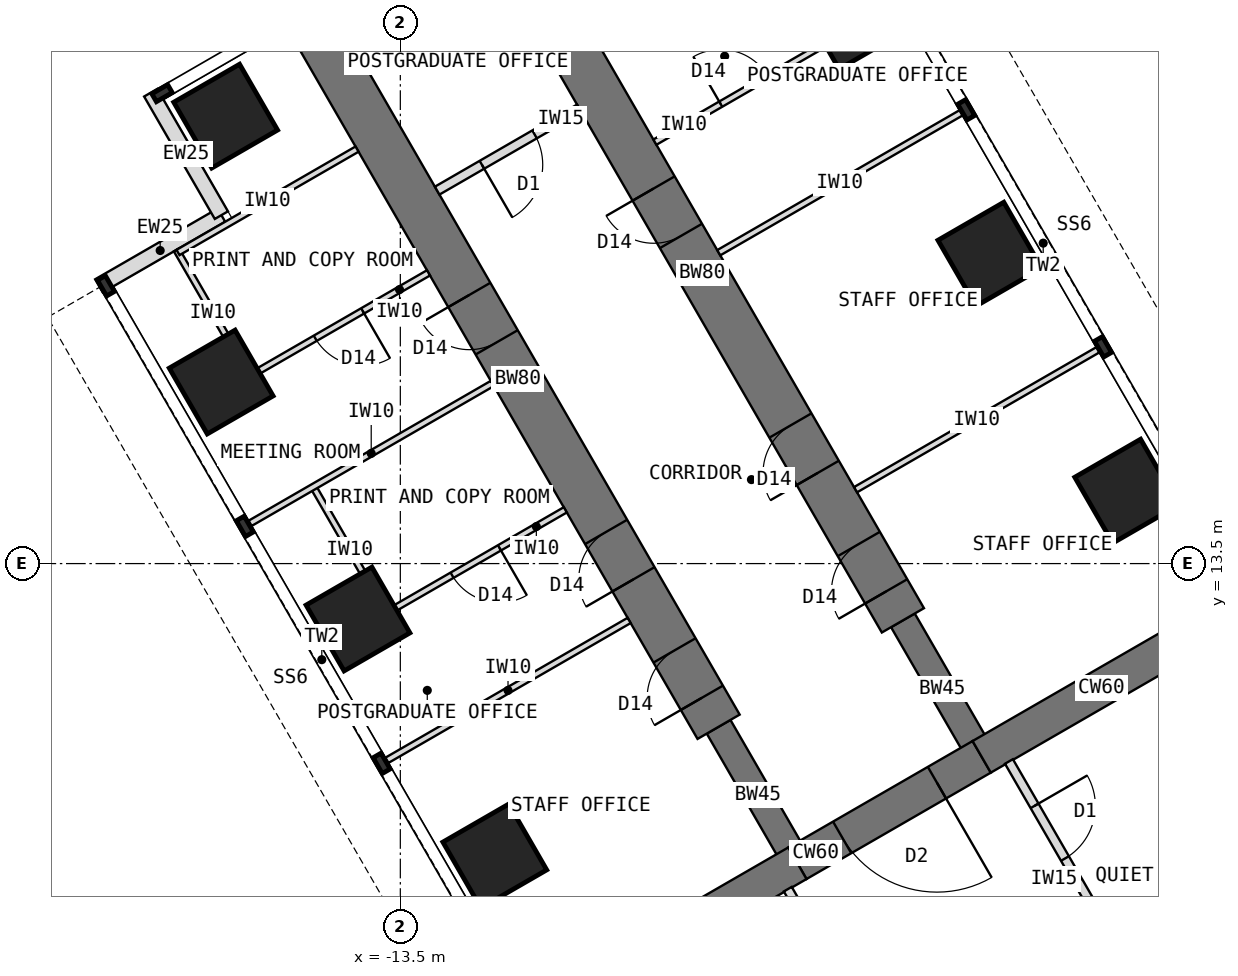
"""IFC4 building model, lengths in metres.
Left out: names, types, materials, properties, quantities, classifications, styles, units other than length and angle.
Written with IfcOpenShell. Run it as: python <this file> out.ifc"""

import sys

from ifc_helpers import new_model, si_unit, direction, frame, frame_2d, origin, origin_2d, place, context, subcontext, project, spatial, rectangle, extrude, element, fill, save


model = new_model("IFC4")
c1 = context("Model", 3, precision=1e-05, world=origin(), true_north=direction((0.0, 1.0)))
c2 = subcontext(c1, "Body", "Model", "MODEL_VIEW")
j1 = project(units=[si_unit("LENGTHUNIT", "METRE"), si_unit("PLANEANGLEUNIT", "RADIAN")], contexts=[c1])
p1 = place(None, origin())
s1 = spatial("IfcSite", under=j1, at=p1, CompositionType="ELEMENT")
p2 = place(p1, origin())
s2 = spatial("IfcBuilding", under=s1, at=p2, CompositionType="ELEMENT")
p3 = place(p2, frame((0.0, 0.0, 161.5)))
s3 = spatial("IfcBuildingStorey", under=s2, at=p3, CompositionType="ELEMENT", Elevation=161.5)
p4 = place(p3, frame((0.0, 12.596, 0.0), z_axis=(0.0, 0.0, 1.0), x_axis=(-0.866011268655, -0.500024481964, 0.0)))
e1 = element("IfcWall", 1, at=p4, inside=s3, PredefinedType="SHEAR", context=c2, shape_type="SweptSolid", body=[
    extrude(rectangle(XDim=4.548, YDim=0.6, at=frame_2d((2.274, 0.0))), origin(), (0.0, 0.0, 1.0), 4.0),
])
p5 = place(p3, frame((-3.939, 10.322, 0.0), z_axis=(0.0, 0.0, 1.0), x_axis=(-0.866019471182, -0.500010275428, 0.0)))
e2 = element("IfcWall", 2, at=p5, inside=s3, PredefinedType="SHEAR", context=c2, shape_type="SweptSolid", body=[
    extrude(rectangle(XDim=3.5, YDim=0.6, at=frame_2d((1.75, 0.0))), origin(), (0.0, 0.0, 1.0), 4.0),
])
p6 = place(p5, frame((0.85, 0.0, 0.0)))
e3 = element("IfcOpeningElement", 3, at=p6, cuts=e2, PredefinedType="OPENING", context=c2, shape_type="SweptSolid", body=[
    extrude(rectangle(XDim=1.8, YDim=2.1, at=frame_2d((0.9, 1.05))), frame((0.0, 0.31, 0.0), z_axis=(0.0, -1.0, 0.0), x_axis=(1.0, 0.0, 0.0)), (0.0, 0.0, 1.0), 0.62),
])
p7 = place(p3, frame((-6.97, 8.572, 0.0), z_axis=(0.0, 0.0, 1.0), x_axis=(-0.866034513004, -0.499984222037, 0.0)))
e4 = element("IfcWall", 4, at=p7, inside=s3, PredefinedType="SHEAR", context=c2, shape_type="SweptSolid", body=[
    extrude(rectangle(XDim=4.548, YDim=0.6, at=frame_2d((2.274, 0.0))), origin(), (0.0, 0.0, 1.0), 4.0),
])
p8 = place(p3, frame((-6.97, 8.572, 0.0), z_axis=(0.0, 0.0, 1.0), x_axis=(-0.499988811324, 0.866031863473, 0.0)))
e5 = element("IfcWall", 5, at=p8, inside=s3, PredefinedType="SHEAR", context=c2, shape_type="SweptSolid", body=[
    extrude(rectangle(XDim=2.592, YDim=0.45, at=frame_2d((1.296, 0.0))), origin(), (0.0, 0.0, 1.0), 4.0),
])
p9 = place(p3, frame((-8.266, 10.816, 0.0), z_axis=(0.0, 0.0, 1.0), x_axis=(-0.499996231654, 0.866027579429, 0.0)))
e6 = element("IfcWall", 6, at=p9, inside=s3, PredefinedType="SHEAR", context=c2, shape_type="SweptSolid", body=[
    extrude(rectangle(XDim=13.2, YDim=0.8, at=frame_2d((6.6, 0.0))), origin(), (0.0, 0.0, 1.0), 4.0),
])
p10 = place(p9, frame((0.55, 0.0, 0.0)))
e7 = element("IfcOpeningElement", 7, at=p10, cuts=e6, PredefinedType="OPENING", context=c2, shape_type="SweptSolid", body=[
    extrude(rectangle(XDim=0.9, YDim=2.1, at=frame_2d((0.45, 1.05))), frame((0.0, 0.41, 0.0), z_axis=(0.0, -1.0, 0.0), x_axis=(1.0, 0.0, 0.0)), (0.0, 0.0, 1.0), 0.82),
])
p11 = place(p9, frame((2.8, 0.0, 0.0)))
e8 = element("IfcOpeningElement", 8, at=p11, cuts=e6, PredefinedType="OPENING", context=c2, shape_type="SweptSolid", body=[
    extrude(rectangle(XDim=0.9, YDim=2.1, at=frame_2d((0.45, 1.05))), frame((0.0, 0.41, 0.0), z_axis=(0.0, -1.0, 0.0), x_axis=(1.0, 0.0, 0.0)), (0.0, 0.0, 1.0), 0.82),
])
p12 = place(p9, frame((7.3, 0.0, 0.0)))
e9 = element("IfcOpeningElement", 9, at=p12, cuts=e6, PredefinedType="OPENING", context=c2, shape_type="SweptSolid", body=[
    extrude(rectangle(XDim=0.9, YDim=2.1, at=frame_2d((0.45, 1.05))), frame((0.0, 0.41, 0.0), z_axis=(0.0, -1.0, 0.0), x_axis=(1.0, 0.0, 0.0)), (0.0, 0.0, 1.0), 0.82),
])
p13 = place(p3, frame((-3.939, 10.322, 0.0), z_axis=(0.0, 0.0, 1.0), x_axis=(-0.499918158782, 0.866072649678, 0.0)))
e10 = element("IfcWall", 10, at=p13, inside=s3, PredefinedType="SHEAR", context=c2, shape_type="SweptSolid", body=[
    extrude(rectangle(XDim=2.592, YDim=0.45, at=frame_2d((1.296, 0.0))), origin(), (0.0, 0.0, 1.0), 4.0),
])
p14 = place(p3, frame((-5.234, 12.566, 0.0), z_axis=(0.0, 0.0, 1.0), x_axis=(-0.500010103361, 0.866019570528, 0.0)))
e11 = element("IfcWall", 11, at=p14, inside=s3, PredefinedType="SHEAR", context=c2, shape_type="SweptSolid", body=[
    extrude(rectangle(XDim=13.2, YDim=0.8, at=frame_2d((6.6, 0.0))), origin(), (0.0, 0.0, 1.0), 4.0),
])
p15 = place(p14, frame((0.55, 0.0, 0.0)))
e12 = element("IfcOpeningElement", 12, at=p15, cuts=e11, PredefinedType="OPENING", context=c2, shape_type="SweptSolid", body=[
    extrude(rectangle(XDim=0.9, YDim=2.1, at=frame_2d((0.45, 1.05))), frame((0.0, 0.41, 0.0), z_axis=(0.0, -1.0, 0.0), x_axis=(1.0, 0.0, 0.0)), (0.0, 0.0, 1.0), 0.82),
])
p16 = place(p14, frame((2.8, 0.0, 0.0)))
e13 = element("IfcOpeningElement", 13, at=p16, cuts=e11, PredefinedType="OPENING", context=c2, shape_type="SweptSolid", body=[
    extrude(rectangle(XDim=0.9, YDim=2.1, at=frame_2d((0.45, 1.05))), frame((0.0, 0.41, 0.0), z_axis=(0.0, -1.0, 0.0), x_axis=(1.0, 0.0, 0.0)), (0.0, 0.0, 1.0), 0.82),
])
p17 = place(p14, frame((7.3, 0.0, 0.0)))
e14 = element("IfcOpeningElement", 14, at=p17, cuts=e11, PredefinedType="OPENING", context=c2, shape_type="SweptSolid", body=[
    extrude(rectangle(XDim=0.9, YDim=2.1, at=frame_2d((0.45, 1.05))), frame((0.0, 0.41, 0.0), z_axis=(0.0, -1.0, 0.0), x_axis=(1.0, 0.0, 0.0)), (0.0, 0.0, 1.0), 0.82),
])
for number, where, z_axis, x_axis in (
    (15, (-11.946, 8.691, 0.0), (0.0, 0.0, 1.0), (0.866, 0.5, 0.0)),
    (16, (-1.554, 14.691, 0.0), (0.0, 0.0, 1.0), (0.866, 0.5, 0.0)),
    (17, (-14.196, 12.588, 0.0), (0.0, 0.0, 1.0), (0.866, 0.5, 0.0)),
    (18, (-3.804, 18.588, 0.0), (0.0, 0.0, 1.0), (0.866, 0.5, 0.0)),
    (19, (-16.446, 16.486, 0.0), (0.0, 0.0, 1.0), (0.866, 0.5, 0.0)),
    (20, (-6.054, 22.486, 0.0), (0.0, 0.0, 1.0), (0.866, 0.5, 0.0)),
    (21, (-16.373, 20.858, 0.0), (0.0, 0.0, 1.0), (0.866, 0.5, 0.0)),
):
    element("IfcColumn", number, at=place(p3, frame(where, z_axis=z_axis, x_axis=x_axis)), inside=s3, PredefinedType="COLUMN", context=c2, shape_type="SweptSolid", body=[
        extrude(rectangle(XDim=1.25, YDim=1.25, at=origin_2d()), origin(), (0.0, 0.0, 1.0), 4.0),
    ])
for number, where, z_axis, x_axis in (
    (22, (-18.456, 18.067, 0.0), (0.0, 0.0, 1.0), (0.866, 0.5, 0.0)),
    (23, (-16.443, 19.23, 0.0), (0.0, 0.0, 1.0), (-0.5, 0.866, 0.0)),
):
    element("IfcWall", number, at=place(p3, frame(where, z_axis=z_axis, x_axis=x_axis)), inside=s3, PredefinedType="STANDARD", context=c2, shape_type="SweptSolid", body=[
        extrude(rectangle(XDim=2.325, YDim=0.25, at=frame_2d((1.163, 0.0))), origin(), (0.0, 0.0, 1.0), 3.7),
    ])
p18 = place(p3, frame((-1.201, 6.12, 0.0), z_axis=(0.0, 0.0, 1.0), x_axis=(0.49999668571, 0.866027317282, 0.0)))
e24 = element("IfcWall", 24, at=p18, inside=s3, PredefinedType="SHEAR", context=c2, shape_type="SweptSolid", body=[
    extrude(rectangle(XDim=5.908, YDim=0.4, at=frame_2d((2.954, 0.0))), origin(), (0.0, 0.0, 1.0), 4.0),
])
for number, where, z_axis, x_axis in (
    (25, (-9.737, 12.565, 0.0), (0.0, 0.0, 1.0), (-0.866, -0.5, 0.0)),
    (26, (-11.987, 16.462, 0.0), (0.0, 0.0, 1.0), (-0.866, -0.5, 0.0)),
):
    element("IfcWall", number, at=place(p3, frame(where, z_axis=z_axis, x_axis=x_axis)), inside=s3, PredefinedType="PARTITIONING", context=c2, shape_type="SweptSolid", body=[
        extrude(rectangle(XDim=4.6, YDim=0.1, at=frame_2d((2.3, 0.0))), origin(), (0.0, 0.0, 1.0), 3.7),
    ])
p19 = place(p3, frame((-13.731, 12.684, 0.0), z_axis=(0.0, 0.0, 1.0), x_axis=(-0.500001309137, 0.866024647952, 0.0)))
e27 = element("IfcWall", 27, at=p19, inside=s3, PredefinedType="PARTITIONING", context=c2, shape_type="SweptSolid", body=[
    extrude(rectangle(XDim=2.4, YDim=0.1, at=frame_2d((1.2, 0.0))), origin(), (0.0, 0.0, 1.0), 3.7),
])
p20 = place(p3, frame((-10.787, 14.384, 0.0), z_axis=(0.0, 0.0, 1.0), x_axis=(-0.866038511948, -0.499977295307, 0.0)))
e28 = element("IfcWall", 28, at=p20, inside=s3, PredefinedType="PARTITIONING", context=c2, shape_type="SweptSolid", body=[
    extrude(rectangle(XDim=3.4, YDim=0.1, at=frame_2d((1.7, 0.0))), origin(), (0.0, 0.0, 1.0), 3.7),
])
p21 = place(p20, frame((1.25, 0.0, 0.0)))
e29 = element("IfcOpeningElement", 29, at=p21, cuts=e28, PredefinedType="OPENING", context=c2, shape_type="SweptSolid", body=[
    extrude(rectangle(XDim=0.9, YDim=2.1, at=frame_2d((0.45, 1.05))), frame((0.0, 0.06, 0.0), z_axis=(0.0, -1.0, 0.0), x_axis=(1.0, 0.0, 0.0)), (0.0, 0.0, 1.0), 0.12),
])
p22 = place(p3, frame((-15.981, 16.581, 0.0), z_axis=(0.0, 0.0, 1.0), x_axis=(-0.499957262057, 0.866050077142, 0.0)))
e30 = element("IfcWall", 30, at=p22, inside=s3, PredefinedType="PARTITIONING", context=c2, shape_type="SweptSolid", body=[
    extrude(rectangle(XDim=2.4, YDim=0.1, at=frame_2d((1.2, 0.0))), origin(), (0.0, 0.0, 1.0), 3.7),
])
p23 = place(p3, frame((-13.037, 18.281, 0.0), z_axis=(0.0, 0.0, 1.0), x_axis=(-0.866007419912, -0.500031147688, 0.0)))
e31 = element("IfcWall", 31, at=p23, inside=s3, PredefinedType="PARTITIONING", context=c2, shape_type="SweptSolid", body=[
    extrude(rectangle(XDim=3.4, YDim=0.1, at=frame_2d((1.7, 0.0))), origin(), (0.0, 0.0, 1.0), 3.7),
])
p24 = place(p23, frame((1.25, 0.0, 0.0)))
e32 = element("IfcOpeningElement", 32, at=p24, cuts=e31, PredefinedType="OPENING", context=c2, shape_type="SweptSolid", body=[
    extrude(rectangle(XDim=0.9, YDim=2.1, at=frame_2d((0.45, 1.05))), frame((0.0, 0.06, 0.0), z_axis=(0.0, -1.0, 0.0), x_axis=(1.0, 0.0, 0.0)), (0.0, 0.0, 1.0), 0.12),
])
p25 = place(p3, frame((-14.212, 20.316, 0.0), z_axis=(0.0, 0.0, 1.0), x_axis=(-0.866007419912, -0.500031147688, 0.0)))
e33 = element("IfcWall", 33, at=p25, inside=s3, PredefinedType="PARTITIONING", context=c2, shape_type="SweptSolid", body=[
    extrude(rectangle(XDim=3.4, YDim=0.1, at=frame_2d((1.7, 0.0))), origin(), (0.0, 0.0, 1.0), 3.7),
])
for number, where, z_axis, x_axis in (
    (34, (-6.013, 14.715, 0.0), (0.0, 0.0, 1.0), (0.866, 0.5, 0.0)),
    (35, (-8.263, 18.612, 0.0), (0.0, 0.0, 1.0), (0.866, 0.5, 0.0)),
):
    element("IfcWall", number, at=place(p3, frame(where, z_axis=z_axis, x_axis=x_axis)), inside=s3, PredefinedType="PARTITIONING", context=c2, shape_type="SweptSolid", body=[
        extrude(rectangle(XDim=4.6, YDim=0.1, at=frame_2d((2.3, 0.0))), origin(), (0.0, 0.0, 1.0), 3.7),
    ])
p26 = place(p3, frame((-9.313, 20.431, 0.0), z_axis=(0.0, 0.0, 1.0), x_axis=(0.866020560687, 0.500008388397, 0.0)))
e36 = element("IfcWall", 36, at=p26, inside=s3, PredefinedType="PARTITIONING", context=c2, shape_type="SweptSolid", body=[
    extrude(rectangle(XDim=3.4, YDim=0.1, at=frame_2d((1.7, 0.0))), origin(), (0.0, 0.0, 1.0), 3.7),
])
p27 = place(p26, frame((1.25, 0.0, 0.0)))
e37 = element("IfcOpeningElement", 37, at=p27, cuts=e36, PredefinedType="OPENING", context=c2, shape_type="SweptSolid", body=[
    extrude(rectangle(XDim=0.9, YDim=2.1, at=frame_2d((0.45, 1.05))), frame((0.0, 0.06, 0.0), z_axis=(0.0, -1.0, 0.0), x_axis=(1.0, 0.0, 0.0)), (0.0, 0.0, 1.0), 0.12),
])
p28 = place(p3, frame((-4.89, 4.27, 0.0), z_axis=(0.0, 0.0, 1.0), x_axis=(-0.499999473313, 0.866025707867, 0.0)))
e38 = element("IfcWall", 38, at=p28, inside=s3, PredefinedType="PARTITIONING", context=c2, shape_type="SweptSolid", body=[
    extrude(rectangle(XDim=4.476, YDim=0.15, at=frame_2d((2.238, 0.0))), origin(), (0.0, 0.0, 1.0), 3.7),
])
p29 = place(p28, frame((0.843, 0.0, 0.0)))
e39 = element("IfcOpeningElement", 39, at=p29, cuts=e38, PredefinedType="OPENING", context=c2, shape_type="SweptSolid", body=[
    extrude(rectangle(XDim=1.0, YDim=2.1, at=frame_2d((0.5, 1.05))), frame((0.0, 0.085, 0.0), z_axis=(0.0, -1.0, 0.0), x_axis=(1.0, 0.0, 0.0)), (0.0, 0.0, 1.0), 0.17),
])
p30 = place(p3, frame((-3.49, 10.246, 0.0), z_axis=(0.0, 0.0, 1.0), x_axis=(0.499999473313, -0.866025707867, 0.0)))
e40 = element("IfcWall", 40, at=p30, inside=s3, PredefinedType="PARTITIONING", context=c2, shape_type="SweptSolid", body=[
    extrude(rectangle(XDim=4.476, YDim=0.15, at=frame_2d((2.238, 0.0))), origin(), (0.0, 0.0, 1.0), 3.7),
])
p31 = place(p30, frame((0.843, 0.0, 0.0)))
e41 = element("IfcOpeningElement", 41, at=p31, cuts=e40, PredefinedType="OPENING", context=c2, shape_type="SweptSolid", body=[
    extrude(rectangle(XDim=1.0, YDim=2.1, at=frame_2d((0.5, 1.05))), frame((0.0, 0.085, 0.0), z_axis=(0.0, -1.0, 0.0), x_axis=(1.0, 0.0, 0.0)), (0.0, 0.0, 1.0), 0.17),
])
p32 = place(p3, frame((-10.556, 20.983, 0.0), z_axis=(0.0, 0.0, 1.0), x_axis=(-0.86599734893, -0.500048589285, 0.0)))
e42 = element("IfcWall", 42, at=p32, inside=s3, PredefinedType="PARTITIONING", context=c2, shape_type="SweptSolid", body=[
    extrude(rectangle(XDim=2.7, YDim=0.15, at=frame_2d((1.35, 0.0))), origin(), (0.0, 0.0, 1.0), 3.7),
])
p33 = place(p32, frame((0.85, 0.0, 0.0)))
e43 = element("IfcOpeningElement", 43, at=p33, cuts=e42, PredefinedType="OPENING", context=c2, shape_type="SweptSolid", body=[
    extrude(rectangle(XDim=1.0, YDim=2.1, at=frame_2d((0.5, 1.05))), frame((0.0, 0.085, 0.0), z_axis=(0.0, -1.0, 0.0), x_axis=(1.0, 0.0, 0.0)), (0.0, 0.0, 1.0), 0.17),
])
p34 = place(p6, origin())
e44 = element("IfcDoor", 44, at=p34, inside=s3, OperationType="DOUBLE_DOOR_DOUBLE_SWING", PredefinedType="DOOR", context=c2, shape_type="SweptSolid", body=[
    extrude(rectangle(XDim=1.72, YDim=2.06, at=frame_2d((0.9, 1.03))), frame((0.0, 0.025, 0.0), z_axis=(0.0, -1.0, 0.0), x_axis=(1.0, 0.0, 0.0)), (0.0, 0.0, 1.0), 0.05),
    extrude(rectangle(XDim=0.04, YDim=2.1, at=frame_2d((0.02, 1.05))), frame((0.0, 0.3, 0.0), z_axis=(0.0, -1.0, 0.0), x_axis=(1.0, 0.0, 0.0)), (0.0, 0.0, 1.0), 0.6),
    extrude(rectangle(XDim=0.04, YDim=2.1, at=frame_2d((1.78, 1.05))), frame((0.0, 0.3, 0.0), z_axis=(0.0, -1.0, 0.0), x_axis=(1.0, 0.0, 0.0)), (0.0, 0.0, 1.0), 0.6),
    extrude(rectangle(XDim=1.72, YDim=0.04, at=frame_2d((0.9, 2.08))), frame((0.0, 0.3, 0.0), z_axis=(0.0, -1.0, 0.0), x_axis=(1.0, 0.0, 0.0)), (0.0, 0.0, 1.0), 0.6),
])
fill(e3, e44)
p35 = place(p21, origin())
e45 = element("IfcDoor", 45, at=p35, inside=s3, OperationType="SINGLE_SWING_LEFT", PredefinedType="DOOR", context=c2, shape_type="SweptSolid", body=[
    extrude(rectangle(XDim=0.9, YDim=2.1, at=frame_2d((0.45, 1.05))), frame((0.0, 0.025, 0.0), z_axis=(0.0, -1.0, 0.0), x_axis=(1.0, 0.0, 0.0)), (0.0, 0.0, 1.0), 0.05),
])
fill(e29, e45)
p36 = place(p24, origin())
e46 = element("IfcDoor", 46, at=p36, inside=s3, OperationType="SINGLE_SWING_LEFT", PredefinedType="DOOR", context=c2, shape_type="SweptSolid", body=[
    extrude(rectangle(XDim=0.9, YDim=2.1, at=frame_2d((0.45, 1.05))), frame((0.0, 0.025, 0.0), z_axis=(0.0, -1.0, 0.0), x_axis=(1.0, 0.0, 0.0)), (0.0, 0.0, 1.0), 0.05),
])
fill(e32, e46)
p37 = place(p27, origin())
e47 = element("IfcDoor", 47, at=p37, inside=s3, OperationType="SINGLE_SWING_LEFT", PredefinedType="DOOR", context=c2, shape_type="SweptSolid", body=[
    extrude(rectangle(XDim=0.9, YDim=2.1, at=frame_2d((0.45, 1.05))), frame((0.0, 0.025, 0.0), z_axis=(0.0, -1.0, 0.0), x_axis=(1.0, 0.0, 0.0)), (0.0, 0.0, 1.0), 0.05),
])
fill(e37, e47)
p38 = place(p31, origin())
e48 = element("IfcDoor", 48, at=p38, inside=s3, OperationType="SINGLE_SWING_LEFT", PredefinedType="DOOR", context=c2, shape_type="SweptSolid", body=[
    extrude(rectangle(XDim=1.0, YDim=2.1, at=frame_2d((0.5, 1.05))), frame((0.0, 0.025, 0.0), z_axis=(0.0, -1.0, 0.0), x_axis=(1.0, 0.0, 0.0)), (0.0, 0.0, 1.0), 0.05),
])
fill(e41, e48)
p39 = place(p33, origin())
e49 = element("IfcDoor", 49, at=p39, inside=s3, OperationType="SINGLE_SWING_RIGHT", PredefinedType="DOOR", context=c2, shape_type="SweptSolid", body=[
    extrude(rectangle(XDim=1.0, YDim=2.1, at=frame_2d((0.5, 1.05))), frame((0.0, 0.025, 0.0), z_axis=(0.0, -1.0, 0.0), x_axis=(1.0, 0.0, 0.0)), (0.0, 0.0, 1.0), 0.05),
])
fill(e43, e49)
p40 = place(p10, origin())
e50 = element("IfcDoor", 50, at=p40, inside=s3, OperationType="SINGLE_SWING_LEFT", PredefinedType="DOOR", context=c2, shape_type="SweptSolid", body=[
    extrude(rectangle(XDim=0.82, YDim=2.06, at=frame_2d((0.45, 1.03))), frame((0.0, 0.025, 0.0), z_axis=(0.0, -1.0, 0.0), x_axis=(1.0, 0.0, 0.0)), (0.0, 0.0, 1.0), 0.05),
    extrude(rectangle(XDim=0.04, YDim=2.1, at=frame_2d((0.02, 1.05))), frame((0.0, 0.4, 0.0), z_axis=(0.0, -1.0, 0.0), x_axis=(1.0, 0.0, 0.0)), (0.0, 0.0, 1.0), 0.8),
    extrude(rectangle(XDim=0.04, YDim=2.1, at=frame_2d((0.88, 1.05))), frame((0.0, 0.4, 0.0), z_axis=(0.0, -1.0, 0.0), x_axis=(1.0, 0.0, 0.0)), (0.0, 0.0, 1.0), 0.8),
    extrude(rectangle(XDim=0.82, YDim=0.04, at=frame_2d((0.45, 2.08))), frame((0.0, 0.4, 0.0), z_axis=(0.0, -1.0, 0.0), x_axis=(1.0, 0.0, 0.0)), (0.0, 0.0, 1.0), 0.8),
])
fill(e7, e50)
p41 = place(p11, origin())
e51 = element("IfcDoor", 51, at=p41, inside=s3, OperationType="SINGLE_SWING_LEFT", PredefinedType="DOOR", context=c2, shape_type="SweptSolid", body=[
    extrude(rectangle(XDim=0.82, YDim=2.06, at=frame_2d((0.45, 1.03))), frame((0.0, 0.025, 0.0), z_axis=(0.0, -1.0, 0.0), x_axis=(1.0, 0.0, 0.0)), (0.0, 0.0, 1.0), 0.05),
    extrude(rectangle(XDim=0.04, YDim=2.1, at=frame_2d((0.02, 1.05))), frame((0.0, 0.4, 0.0), z_axis=(0.0, -1.0, 0.0), x_axis=(1.0, 0.0, 0.0)), (0.0, 0.0, 1.0), 0.8),
    extrude(rectangle(XDim=0.04, YDim=2.1, at=frame_2d((0.88, 1.05))), frame((0.0, 0.4, 0.0), z_axis=(0.0, -1.0, 0.0), x_axis=(1.0, 0.0, 0.0)), (0.0, 0.0, 1.0), 0.8),
    extrude(rectangle(XDim=0.82, YDim=0.04, at=frame_2d((0.45, 2.08))), frame((0.0, 0.4, 0.0), z_axis=(0.0, -1.0, 0.0), x_axis=(1.0, 0.0, 0.0)), (0.0, 0.0, 1.0), 0.8),
])
fill(e8, e51)
p42 = place(p12, origin())
e52 = element("IfcDoor", 52, at=p42, inside=s3, OperationType="SINGLE_SWING_RIGHT", PredefinedType="DOOR", context=c2, shape_type="SweptSolid", body=[
    extrude(rectangle(XDim=0.82, YDim=2.06, at=frame_2d((0.45, 1.03))), frame((0.0, 0.025, 0.0), z_axis=(0.0, -1.0, 0.0), x_axis=(1.0, 0.0, 0.0)), (0.0, 0.0, 1.0), 0.05),
    extrude(rectangle(XDim=0.04, YDim=2.1, at=frame_2d((0.02, 1.05))), frame((0.0, 0.4, 0.0), z_axis=(0.0, -1.0, 0.0), x_axis=(1.0, 0.0, 0.0)), (0.0, 0.0, 1.0), 0.8),
    extrude(rectangle(XDim=0.04, YDim=2.1, at=frame_2d((0.88, 1.05))), frame((0.0, 0.4, 0.0), z_axis=(0.0, -1.0, 0.0), x_axis=(1.0, 0.0, 0.0)), (0.0, 0.0, 1.0), 0.8),
    extrude(rectangle(XDim=0.82, YDim=0.04, at=frame_2d((0.45, 2.08))), frame((0.0, 0.4, 0.0), z_axis=(0.0, -1.0, 0.0), x_axis=(1.0, 0.0, 0.0)), (0.0, 0.0, 1.0), 0.8),
])
fill(e9, e52)
p43 = place(p15, origin())
e53 = element("IfcDoor", 53, at=p43, inside=s3, OperationType="SINGLE_SWING_LEFT", PredefinedType="DOOR", context=c2, shape_type="SweptSolid", body=[
    extrude(rectangle(XDim=0.82, YDim=2.06, at=frame_2d((0.45, 1.03))), frame((0.0, 0.025, 0.0), z_axis=(0.0, -1.0, 0.0), x_axis=(1.0, 0.0, 0.0)), (0.0, 0.0, 1.0), 0.05),
    extrude(rectangle(XDim=0.04, YDim=2.1, at=frame_2d((0.02, 1.05))), frame((0.0, 0.4, 0.0), z_axis=(0.0, -1.0, 0.0), x_axis=(1.0, 0.0, 0.0)), (0.0, 0.0, 1.0), 0.8),
    extrude(rectangle(XDim=0.04, YDim=2.1, at=frame_2d((0.88, 1.05))), frame((0.0, 0.4, 0.0), z_axis=(0.0, -1.0, 0.0), x_axis=(1.0, 0.0, 0.0)), (0.0, 0.0, 1.0), 0.8),
    extrude(rectangle(XDim=0.82, YDim=0.04, at=frame_2d((0.45, 2.08))), frame((0.0, 0.4, 0.0), z_axis=(0.0, -1.0, 0.0), x_axis=(1.0, 0.0, 0.0)), (0.0, 0.0, 1.0), 0.8),
])
fill(e12, e53)
p44 = place(p16, origin())
e54 = element("IfcDoor", 54, at=p44, inside=s3, OperationType="SINGLE_SWING_LEFT", PredefinedType="DOOR", context=c2, shape_type="SweptSolid", body=[
    extrude(rectangle(XDim=0.82, YDim=2.06, at=frame_2d((0.45, 1.03))), frame((0.0, 0.025, 0.0), z_axis=(0.0, -1.0, 0.0), x_axis=(1.0, 0.0, 0.0)), (0.0, 0.0, 1.0), 0.05),
    extrude(rectangle(XDim=0.04, YDim=2.1, at=frame_2d((0.02, 1.05))), frame((0.0, 0.4, 0.0), z_axis=(0.0, -1.0, 0.0), x_axis=(1.0, 0.0, 0.0)), (0.0, 0.0, 1.0), 0.8),
    extrude(rectangle(XDim=0.04, YDim=2.1, at=frame_2d((0.88, 1.05))), frame((0.0, 0.4, 0.0), z_axis=(0.0, -1.0, 0.0), x_axis=(1.0, 0.0, 0.0)), (0.0, 0.0, 1.0), 0.8),
    extrude(rectangle(XDim=0.82, YDim=0.04, at=frame_2d((0.45, 2.08))), frame((0.0, 0.4, 0.0), z_axis=(0.0, -1.0, 0.0), x_axis=(1.0, 0.0, 0.0)), (0.0, 0.0, 1.0), 0.8),
])
fill(e13, e54)
p45 = place(p17, origin())
e55 = element("IfcDoor", 55, at=p45, inside=s3, OperationType="SINGLE_SWING_RIGHT", PredefinedType="DOOR", context=c2, shape_type="SweptSolid", body=[
    extrude(rectangle(XDim=0.82, YDim=2.06, at=frame_2d((0.45, 1.03))), frame((0.0, 0.025, 0.0), z_axis=(0.0, -1.0, 0.0), x_axis=(1.0, 0.0, 0.0)), (0.0, 0.0, 1.0), 0.05),
    extrude(rectangle(XDim=0.04, YDim=2.1, at=frame_2d((0.02, 1.05))), frame((0.0, 0.4, 0.0), z_axis=(0.0, -1.0, 0.0), x_axis=(1.0, 0.0, 0.0)), (0.0, 0.0, 1.0), 0.8),
    extrude(rectangle(XDim=0.04, YDim=2.1, at=frame_2d((0.88, 1.05))), frame((0.0, 0.4, 0.0), z_axis=(0.0, -1.0, 0.0), x_axis=(1.0, 0.0, 0.0)), (0.0, 0.0, 1.0), 0.8),
    extrude(rectangle(XDim=0.82, YDim=0.04, at=frame_2d((0.45, 2.08))), frame((0.0, 0.4, 0.0), z_axis=(0.0, -1.0, 0.0), x_axis=(1.0, 0.0, 0.0)), (0.0, 0.0, 1.0), 0.8),
])
fill(e14, e55)
save(model, sys.argv[1])
